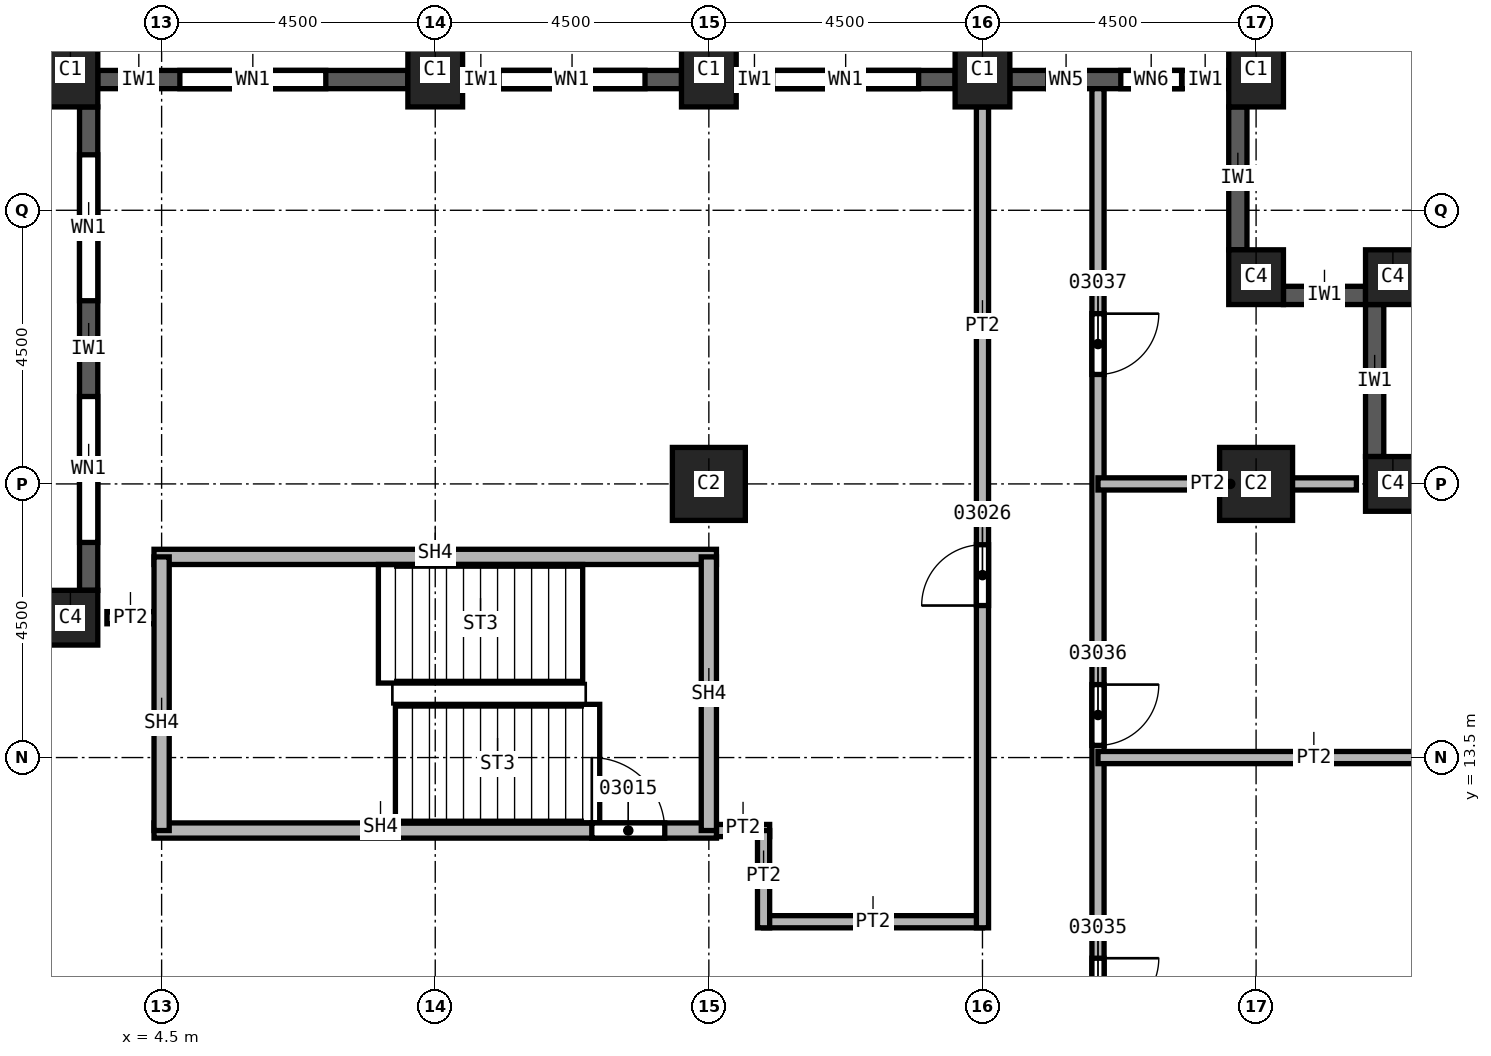
"""IFC4 building model, lengths in metres.
Left out: names, types, materials, properties, quantities, classifications, styles, units other than length and angle.
Written with IfcOpenShell. Run it as: python <this file> out.ifc"""

import sys

from ifc_helpers import new_model, si_unit, direction, frame, frame_2d, origin, origin_2d, place, context, subcontext, project, spatial, rectangle, extrude, element, fill, save


model = new_model("IFC4")
c1 = context("Model", 3, precision=1e-05, world=origin(), true_north=direction((0.0, 1.0)))
c2 = subcontext(c1, "Body", "Model", "MODEL_VIEW")
j1 = project(units=[si_unit("LENGTHUNIT", "METRE"), si_unit("PLANEANGLEUNIT", "RADIAN")], contexts=[c1])
p1 = place(None, origin())
s1 = spatial("IfcSite", under=j1, at=p1, CompositionType="ELEMENT")
p2 = place(p1, origin())
s2 = spatial("IfcBuilding", under=s1, at=p2, CompositionType="ELEMENT")
p3 = place(p2, frame((0.0, 0.0, 92.0)))
s3 = spatial("IfcBuildingStorey", under=s2, at=p3, CompositionType="ELEMENT", Elevation=92.0)
for number, where, z_axis, x_axis in (
    (1, (13.5, 18.0, 0.0), (0.0, 0.0, 1.0), (1.0, 0.0, 0.0)),
    (2, (22.5, 18.0, 0.0), (0.0, 0.0, 1.0), (1.0, 0.0, 0.0)),
):
    element("IfcColumn", number, at=place(p3, frame(where, z_axis=z_axis, x_axis=x_axis)), inside=s3, PredefinedType="COLUMN", context=c2, shape_type="SweptSolid", body=[
        extrude(rectangle(XDim=1.2, YDim=1.2, at=origin_2d()), origin(), (0.0, 0.0, 1.0), 3.7),
    ])
for number, where, z_axis, x_axis in (
    (3, (3.0, 24.8, 0.0), (0.0, 0.0, 1.0), (1.0, 0.0, 0.0)),
    (4, (9.0, 24.8, 0.0), (0.0, 0.0, 1.0), (1.0, 0.0, 0.0)),
    (5, (13.5, 24.8, 0.0), (0.0, 0.0, 1.0), (1.0, 0.0, 0.0)),
    (6, (18.0, 24.8, 0.0), (0.0, 0.0, 1.0), (1.0, 0.0, 0.0)),
    (7, (22.5, 24.8, 0.0), (0.0, 0.0, 1.0), (1.0, 0.0, 0.0)),
):
    element("IfcColumn", number, at=place(p3, frame(where, z_axis=z_axis, x_axis=x_axis)), inside=s3, PredefinedType="COLUMN", context=c2, shape_type="SweptSolid", body=[
        extrude(rectangle(XDim=0.9, YDim=1.2, at=origin_2d()), origin(), (0.0, 0.0, 1.0), 3.7),
    ])
for number, where, z_axis, x_axis in (
    (8, (3.0, 15.8, 0.0), (0.0, 0.0, 1.0), (1.0, 0.0, 0.0)),
    (9, (22.5, 21.4, 0.0), (0.0, 0.0, 1.0), (1.0, 0.0, 0.0)),
    (10, (24.75, 21.4, 0.0), (0.0, 0.0, 1.0), (1.0, 0.0, 0.0)),
    (11, (24.75, 18.0, 0.0), (0.0, 0.0, 1.0), (1.0, 0.0, 0.0)),
):
    element("IfcColumn", number, at=place(p3, frame(where, z_axis=z_axis, x_axis=x_axis)), inside=s3, PredefinedType="COLUMN", context=c2, shape_type="SweptSolid", body=[
        extrude(rectangle(XDim=0.9, YDim=0.9, at=origin_2d()), origin(), (0.0, 0.0, 1.0), 3.7),
    ])
p4 = place(p3, frame((24.45, 18.45, 0.0), z_axis=(0.0, 0.0, 1.0), x_axis=(0.0, 1.0, 0.0)))
e12 = element("IfcWall", 12, at=p4, inside=s3, PredefinedType="SOLIDWALL", context=c2, shape_type="SweptSolid", body=[
    extrude(rectangle(XDim=2.5, YDim=0.3, at=frame_2d((1.25, 0.0))), origin(), (0.0, 0.0, 1.0), 3.1),
])
p5 = place(p3, frame((24.3, 21.1, 0.0), z_axis=(0.0, 0.0, 1.0), x_axis=(-1.0, 0.0, 0.0)))
e13 = element("IfcWall", 13, at=p5, inside=s3, PredefinedType="SOLIDWALL", context=c2, shape_type="SweptSolid", body=[
    extrude(rectangle(XDim=1.35, YDim=0.3, at=frame_2d((0.675, 0.0))), origin(), (0.0, 0.0, 1.0), 3.1),
])
p6 = place(p3, frame((22.2, 21.85, 0.0), z_axis=(0.0, 0.0, 1.0), x_axis=(0.0, 1.0, 0.0)))
e14 = element("IfcWall", 14, at=p6, inside=s3, PredefinedType="SOLIDWALL", context=c2, shape_type="SweptSolid", body=[
    extrude(rectangle(XDim=2.35, YDim=0.3, at=frame_2d((1.175, 0.0))), origin(), (0.0, 0.0, 1.0), 3.1),
])
p7 = place(p3, frame((22.05, 24.65, 0.0), z_axis=(0.0, 0.0, 1.0), x_axis=(-1.0, 0.0, 0.0)))
e15 = element("IfcWall", 15, at=p7, inside=s3, PredefinedType="SOLIDWALL", context=c2, shape_type="SweptSolid", body=[
    extrude(rectangle(XDim=3.6, YDim=0.3, at=frame_2d((1.8, 0.0))), origin(), (0.0, 0.0, 1.0), 3.1),
])
p8 = place(p7, frame((0.775, 0.0, 0.8)))
e16 = element("IfcOpeningElement", 16, at=p8, cuts=e15, PredefinedType="OPENING", context=c2, shape_type="SweptSolid", body=[
    extrude(rectangle(XDim=1.0, YDim=1.95, at=frame_2d((0.5, 0.975))), frame((0.0, 0.15, 0.0), z_axis=(0.0, -1.0, 0.0), x_axis=(1.0, 0.0, 0.0)), (0.0, 0.0, 1.0), 0.3),
])
p9 = place(p7, frame((2.375, 0.0, 0.8)))
e17 = element("IfcOpeningElement", 17, at=p9, cuts=e15, PredefinedType="OPENING", context=c2, shape_type="SweptSolid", body=[
    extrude(rectangle(XDim=0.6, YDim=1.95, at=frame_2d((0.3, 0.975))), frame((0.0, 0.15, 0.0), z_axis=(0.0, -1.0, 0.0), x_axis=(1.0, 0.0, 0.0)), (0.0, 0.0, 1.0), 0.3),
])
p10 = place(p3, frame((17.55, 24.65, 0.0), z_axis=(0.0, 0.0, 1.0), x_axis=(-1.0, 0.0, 0.0)))
e18 = element("IfcWall", 18, at=p10, inside=s3, PredefinedType="SOLIDWALL", context=c2, shape_type="SweptSolid", body=[
    extrude(rectangle(XDim=3.6, YDim=0.3, at=frame_2d((1.8, 0.0))), origin(), (0.0, 0.0, 1.0), 3.1),
])
p11 = place(p10, frame((0.6, 0.0, 0.8)))
e19 = element("IfcOpeningElement", 19, at=p11, cuts=e18, PredefinedType="OPENING", context=c2, shape_type="SweptSolid", body=[
    extrude(rectangle(XDim=2.4, YDim=1.95, at=frame_2d((1.2, 0.975))), frame((0.0, 0.15, 0.0), z_axis=(0.0, -1.0, 0.0), x_axis=(1.0, 0.0, 0.0)), (0.0, 0.0, 1.0), 0.3),
])
p12 = place(p3, frame((13.05, 24.65, 0.0), z_axis=(0.0, 0.0, 1.0), x_axis=(-1.0, 0.0, 0.0)))
e20 = element("IfcWall", 20, at=p12, inside=s3, PredefinedType="SOLIDWALL", context=c2, shape_type="SweptSolid", body=[
    extrude(rectangle(XDim=3.6, YDim=0.3, at=frame_2d((1.8, 0.0))), origin(), (0.0, 0.0, 1.0), 3.1),
])
p13 = place(p12, frame((0.6, 0.0, 0.8)))
e21 = element("IfcOpeningElement", 21, at=p13, cuts=e20, PredefinedType="OPENING", context=c2, shape_type="SweptSolid", body=[
    extrude(rectangle(XDim=2.4, YDim=1.95, at=frame_2d((1.2, 0.975))), frame((0.0, 0.15, 0.0), z_axis=(0.0, -1.0, 0.0), x_axis=(1.0, 0.0, 0.0)), (0.0, 0.0, 1.0), 0.3),
])
p14 = place(p3, frame((8.55, 24.65, 0.0), z_axis=(0.0, 0.0, 1.0), x_axis=(-1.0, 0.0, 0.0)))
e22 = element("IfcWall", 22, at=p14, inside=s3, PredefinedType="SOLIDWALL", context=c2, shape_type="SweptSolid", body=[
    extrude(rectangle(XDim=5.1, YDim=0.3, at=frame_2d((2.55, 0.0))), origin(), (0.0, 0.0, 1.0), 3.1),
])
p15 = place(p14, frame((1.35, 0.0, 0.8)))
e23 = element("IfcOpeningElement", 23, at=p15, cuts=e22, PredefinedType="OPENING", context=c2, shape_type="SweptSolid", body=[
    extrude(rectangle(XDim=2.4, YDim=1.95, at=frame_2d((1.2, 0.975))), frame((0.0, 0.15, 0.0), z_axis=(0.0, -1.0, 0.0), x_axis=(1.0, 0.0, 0.0)), (0.0, 0.0, 1.0), 0.3),
])
p16 = place(p3, frame((3.3, 24.2, 0.0), z_axis=(0.0, 0.0, 1.0), x_axis=(0.0, -1.0, 0.0)))
e24 = element("IfcWall", 24, at=p16, inside=s3, PredefinedType="SOLIDWALL", context=c2, shape_type="SweptSolid", body=[
    extrude(rectangle(XDim=7.95, YDim=0.3, at=frame_2d((3.975, 0.0))), origin(), (0.0, 0.0, 1.0), 3.1),
])
p17 = place(p16, frame((0.788, 0.0, 0.8)))
e25 = element("IfcOpeningElement", 25, at=p17, cuts=e24, PredefinedType="OPENING", context=c2, shape_type="SweptSolid", body=[
    extrude(rectangle(XDim=2.4, YDim=1.95, at=frame_2d((1.2, 0.975))), frame((0.0, 0.15, 0.0), z_axis=(0.0, -1.0, 0.0), x_axis=(1.0, 0.0, 0.0)), (0.0, 0.0, 1.0), 0.3),
])
p18 = place(p16, frame((4.762, 0.0, 0.8)))
e26 = element("IfcOpeningElement", 26, at=p18, cuts=e24, PredefinedType="OPENING", context=c2, shape_type="SweptSolid", body=[
    extrude(rectangle(XDim=2.4, YDim=1.95, at=frame_2d((1.2, 0.975))), frame((0.0, 0.15, 0.0), z_axis=(0.0, -1.0, 0.0), x_axis=(1.0, 0.0, 0.0)), (0.0, 0.0, 1.0), 0.3),
])
p19 = place(p3, frame((3.6, 15.8, 0.0), z_axis=(0.0, 0.0, 1.0), x_axis=(1.0, 0.0, 0.0)))
e27 = element("IfcWall", 27, at=p19, inside=s3, PredefinedType="PARTITIONING", context=c2, shape_type="SweptSolid", body=[
    extrude(rectangle(XDim=0.9, YDim=0.2, at=frame_2d((0.45, 0.0))), origin(), (0.0, 0.0, 1.0), 3.7),
])
p20 = place(p3, frame((13.375, 12.3, 0.0), z_axis=(0.0, 0.0, 1.0), x_axis=(1.0, 0.0, 0.0)))
e28 = element("IfcWall", 28, at=p20, inside=s3, PredefinedType="PARTITIONING", context=c2, shape_type="SweptSolid", body=[
    extrude(rectangle(XDim=1.125, YDim=0.2, at=frame_2d((0.562, 0.0))), origin(), (0.0, 0.0, 1.0), 3.7),
])
p21 = place(p3, frame((14.4, 10.8, 0.0), z_axis=(0.0, 0.0, 1.0), x_axis=(1.0, 0.0, 0.0)))
e29 = element("IfcWall", 29, at=p21, inside=s3, PredefinedType="PARTITIONING", context=c2, shape_type="SweptSolid", body=[
    extrude(rectangle(XDim=3.6, YDim=0.2, at=frame_2d((1.8, 0.0))), origin(), (0.0, 0.0, 1.0), 3.7),
])
p22 = place(p3, frame((14.4, 12.3, 0.0), z_axis=(0.0, 0.0, 1.0), x_axis=(0.0, -1.0, 0.0)))
e30 = element("IfcWall", 30, at=p22, inside=s3, PredefinedType="PARTITIONING", context=c2, shape_type="SweptSolid", body=[
    extrude(rectangle(XDim=1.6, YDim=0.2, at=frame_2d((0.8, 0.0))), origin(), (0.0, 0.0, 1.0), 3.7),
])
p23 = place(p3, frame((18.0, 10.7, 0.0), z_axis=(0.0, 0.0, 1.0), x_axis=(0.0, 1.0, 0.0)))
e31 = element("IfcWall", 31, at=p23, inside=s3, PredefinedType="PARTITIONING", context=c2, shape_type="SweptSolid", body=[
    extrude(rectangle(XDim=13.5, YDim=0.2, at=frame_2d((6.75, 0.0))), origin(), (0.0, 0.0, 1.0), 3.7),
])
p24 = place(p23, frame((5.3, 0.0, 0.0)))
e32 = element("IfcOpeningElement", 32, at=p24, cuts=e31, PredefinedType="OPENING", context=c2, shape_type="SweptSolid", body=[
    extrude(rectangle(XDim=1.0, YDim=2.1, at=frame_2d((0.5, 1.05))), frame((0.0, 0.1, 0.0), z_axis=(0.0, -1.0, 0.0), x_axis=(1.0, 0.0, 0.0)), (0.0, 0.0, 1.0), 0.2),
])
p25 = place(p3, frame((19.9, 24.5, 0.0), z_axis=(0.0, 0.0, 1.0), x_axis=(0.0, -1.0, 0.0)))
e33 = element("IfcWall", 33, at=p25, inside=s3, PredefinedType="PARTITIONING", context=c2, shape_type="SweptSolid", body=[
    extrude(rectangle(XDim=25.35, YDim=0.2, at=frame_2d((12.675, 0.0))), origin(), (0.0, 0.0, 1.0), 3.7),
])
p26 = place(p25, frame((17.15, 0.0, 0.0)))
e34 = element("IfcOpeningElement", 34, at=p26, cuts=e33, PredefinedType="OPENING", context=c2, shape_type="SweptSolid", body=[
    extrude(rectangle(XDim=1.0, YDim=2.1, at=frame_2d((0.5, 1.05))), frame((0.0, 0.1, 0.0), z_axis=(0.0, -1.0, 0.0), x_axis=(1.0, 0.0, 0.0)), (0.0, 0.0, 1.0), 0.2),
])
p27 = place(p25, frame((14.3, 0.0, 0.0)))
e35 = element("IfcOpeningElement", 35, at=p27, cuts=e33, PredefinedType="OPENING", context=c2, shape_type="SweptSolid", body=[
    extrude(rectangle(XDim=1.0, YDim=2.1, at=frame_2d((0.5, 1.05))), frame((0.0, 0.1, 0.0), z_axis=(0.0, -1.0, 0.0), x_axis=(1.0, 0.0, 0.0)), (0.0, 0.0, 1.0), 0.2),
])
p28 = place(p25, frame((9.8, 0.0, 0.0)))
e36 = element("IfcOpeningElement", 36, at=p28, cuts=e33, PredefinedType="OPENING", context=c2, shape_type="SweptSolid", body=[
    extrude(rectangle(XDim=1.0, YDim=2.1, at=frame_2d((0.5, 1.05))), frame((0.0, 0.1, 0.0), z_axis=(0.0, -1.0, 0.0), x_axis=(1.0, 0.0, 0.0)), (0.0, 0.0, 1.0), 0.2),
])
p29 = place(p25, frame((3.7, 0.0, 0.0)))
e37 = element("IfcOpeningElement", 37, at=p29, cuts=e33, PredefinedType="OPENING", context=c2, shape_type="SweptSolid", body=[
    extrude(rectangle(XDim=1.0, YDim=2.1, at=frame_2d((0.5, 1.05))), frame((0.0, 0.1, 0.0), z_axis=(0.0, -1.0, 0.0), x_axis=(1.0, 0.0, 0.0)), (0.0, 0.0, 1.0), 0.2),
])
p30 = place(p3, frame((19.9, 13.5, 0.0), z_axis=(0.0, 0.0, 1.0), x_axis=(1.0, 0.0, 0.0)))
e38 = element("IfcWall", 38, at=p30, inside=s3, PredefinedType="PARTITIONING", context=c2, shape_type="SweptSolid", body=[
    extrude(rectangle(XDim=7.2, YDim=0.2, at=frame_2d((3.6, 0.0))), origin(), (0.0, 0.0, 1.0), 3.7),
])
p31 = place(p3, frame((19.9, 18.0, 0.0), z_axis=(0.0, 0.0, 1.0), x_axis=(1.0, 0.0, 0.0)))
e39 = element("IfcWall", 39, at=p31, inside=s3, PredefinedType="PARTITIONING", context=c2, shape_type="SweptSolid", body=[
    extrude(rectangle(XDim=4.25, YDim=0.2, at=frame_2d((2.125, 0.0))), origin(), (0.0, 0.0, 1.0), 3.7),
])
p32 = place(p3, frame((4.375, 12.3, 0.0), z_axis=(0.0, 0.0, 1.0), x_axis=(1.0, 0.0, 0.0)))
e40 = element("IfcWall", 40, at=p32, inside=s3, PredefinedType="SOLIDWALL", context=c2, shape_type="SweptSolid", body=[
    extrude(rectangle(XDim=9.25, YDim=0.25, at=frame_2d((4.625, 0.0))), origin(), (0.0, 0.0, 1.0), 3.7),
])
p33 = place(p32, frame((7.2, 0.0, 0.0)))
e41 = element("IfcOpeningElement", 41, at=p33, cuts=e40, PredefinedType="OPENING", context=c2, shape_type="SweptSolid", body=[
    extrude(rectangle(XDim=1.2, YDim=2.1, at=frame_2d((0.6, 1.05))), frame((0.0, 0.125, 0.0), z_axis=(0.0, -1.0, 0.0), x_axis=(1.0, 0.0, 0.0)), (0.0, 0.0, 1.0), 0.25),
])
p34 = place(p3, frame((4.375, 16.8, 0.0), z_axis=(0.0, 0.0, 1.0), x_axis=(1.0, 0.0, 0.0)))
e42 = element("IfcWall", 42, at=p34, inside=s3, PredefinedType="SOLIDWALL", context=c2, shape_type="SweptSolid", body=[
    extrude(rectangle(XDim=9.25, YDim=0.25, at=frame_2d((4.625, 0.0))), origin(), (0.0, 0.0, 1.0), 3.7),
])
for number, where, z_axis, x_axis in (
    (43, (4.5, 12.3, 0.0), (0.0, 0.0, 1.0), (0.0, 1.0, 0.0)),
    (44, (13.5, 16.8, 0.0), (0.0, 0.0, 1.0), (0.0, -1.0, 0.0)),
):
    element("IfcWall", number, at=place(p3, frame(where, z_axis=z_axis, x_axis=x_axis)), inside=s3, PredefinedType="SOLIDWALL", context=c2, shape_type="SweptSolid", body=[
        extrude(rectangle(XDim=4.5, YDim=0.25, at=frame_2d((2.25, 0.0))), origin(), (0.0, 0.0, 1.0), 3.7),
    ])
p35 = place(p11, origin())
e45 = element("IfcWindow", 45, at=p35, inside=s3, PartitioningType="SINGLE_PANEL", PredefinedType="WINDOW", context=c2, shape_type="SweptSolid", body=[
    extrude(rectangle(XDim=2.4, YDim=1.95, at=frame_2d((1.2, 0.975))), frame((0.0, 0.03, 0.0), z_axis=(0.0, -1.0, 0.0), x_axis=(1.0, 0.0, 0.0)), (0.0, 0.0, 1.0), 0.06),
])
fill(e19, e45)
p36 = place(p13, origin())
e46 = element("IfcWindow", 46, at=p36, inside=s3, PartitioningType="SINGLE_PANEL", PredefinedType="WINDOW", context=c2, shape_type="SweptSolid", body=[
    extrude(rectangle(XDim=2.4, YDim=1.95, at=frame_2d((1.2, 0.975))), frame((0.0, 0.03, 0.0), z_axis=(0.0, -1.0, 0.0), x_axis=(1.0, 0.0, 0.0)), (0.0, 0.0, 1.0), 0.06),
])
fill(e21, e46)
p37 = place(p15, origin())
e47 = element("IfcWindow", 47, at=p37, inside=s3, PartitioningType="SINGLE_PANEL", PredefinedType="WINDOW", context=c2, shape_type="SweptSolid", body=[
    extrude(rectangle(XDim=2.4, YDim=1.95, at=frame_2d((1.2, 0.975))), frame((0.0, 0.03, 0.0), z_axis=(0.0, -1.0, 0.0), x_axis=(1.0, 0.0, 0.0)), (0.0, 0.0, 1.0), 0.06),
])
fill(e23, e47)
p38 = place(p17, origin())
e48 = element("IfcWindow", 48, at=p38, inside=s3, PartitioningType="SINGLE_PANEL", PredefinedType="WINDOW", context=c2, shape_type="SweptSolid", body=[
    extrude(rectangle(XDim=2.4, YDim=1.95, at=frame_2d((1.2, 0.975))), frame((0.0, 0.03, 0.0), z_axis=(0.0, -1.0, 0.0), x_axis=(1.0, 0.0, 0.0)), (0.0, 0.0, 1.0), 0.06),
])
fill(e25, e48)
p39 = place(p18, origin())
e49 = element("IfcWindow", 49, at=p39, inside=s3, PartitioningType="SINGLE_PANEL", PredefinedType="WINDOW", context=c2, shape_type="SweptSolid", body=[
    extrude(rectangle(XDim=2.4, YDim=1.95, at=frame_2d((1.2, 0.975))), frame((0.0, 0.03, 0.0), z_axis=(0.0, -1.0, 0.0), x_axis=(1.0, 0.0, 0.0)), (0.0, 0.0, 1.0), 0.06),
])
fill(e26, e49)
p40 = place(p33, origin())
e50 = element("IfcDoor", 50, at=p40, inside=s3, OperationType="SINGLE_SWING_RIGHT", PredefinedType="DOOR", context=c2, shape_type="SweptSolid", body=[
    extrude(rectangle(XDim=1.2, YDim=2.1, at=frame_2d((0.6, 1.05))), frame((0.0, 0.025, 0.0), z_axis=(0.0, -1.0, 0.0), x_axis=(1.0, 0.0, 0.0)), (0.0, 0.0, 1.0), 0.05),
])
fill(e41, e50)
p41 = place(p24, origin())
e51 = element("IfcDoor", 51, at=p41, inside=s3, OperationType="SINGLE_SWING_LEFT", PredefinedType="DOOR", context=c2, shape_type="SweptSolid", body=[
    extrude(rectangle(XDim=1.0, YDim=2.1, at=frame_2d((0.5, 1.05))), frame((0.0, 0.025, 0.0), z_axis=(0.0, -1.0, 0.0), x_axis=(1.0, 0.0, 0.0)), (0.0, 0.0, 1.0), 0.05),
])
fill(e32, e51)
p42 = place(p27, origin())
e52 = element("IfcDoor", 52, at=p42, inside=s3, OperationType="SINGLE_SWING_RIGHT", PredefinedType="DOOR", context=c2, shape_type="SweptSolid", body=[
    extrude(rectangle(XDim=1.0, YDim=2.1, at=frame_2d((0.5, 1.05))), frame((0.0, 0.025, 0.0), z_axis=(0.0, -1.0, 0.0), x_axis=(1.0, 0.0, 0.0)), (0.0, 0.0, 1.0), 0.05),
])
fill(e35, e52)
p43 = place(p28, origin())
e53 = element("IfcDoor", 53, at=p43, inside=s3, OperationType="SINGLE_SWING_LEFT", PredefinedType="DOOR", context=c2, shape_type="SweptSolid", body=[
    extrude(rectangle(XDim=1.0, YDim=2.1, at=frame_2d((0.5, 1.05))), frame((0.0, 0.025, 0.0), z_axis=(0.0, -1.0, 0.0), x_axis=(1.0, 0.0, 0.0)), (0.0, 0.0, 1.0), 0.05),
])
fill(e36, e53)
p44 = place(p29, origin())
e54 = element("IfcDoor", 54, at=p44, inside=s3, OperationType="SINGLE_SWING_RIGHT", PredefinedType="DOOR", context=c2, shape_type="SweptSolid", body=[
    extrude(rectangle(XDim=1.0, YDim=2.1, at=frame_2d((0.5, 1.05))), frame((0.0, 0.025, 0.0), z_axis=(0.0, -1.0, 0.0), x_axis=(1.0, 0.0, 0.0)), (0.0, 0.0, 1.0), 0.05),
])
fill(e37, e54)
p45 = place(p8, origin())
e55 = element("IfcWindow", 55, at=p45, inside=s3, PartitioningType="SINGLE_PANEL", PredefinedType="WINDOW", context=c2, shape_type="SweptSolid", body=[
    extrude(rectangle(XDim=1.0, YDim=1.95, at=frame_2d((0.5, 0.975))), frame((0.0, 0.03, 0.0), z_axis=(0.0, -1.0, 0.0), x_axis=(1.0, 0.0, 0.0)), (0.0, 0.0, 1.0), 0.06),
])
fill(e16, e55)
p46 = place(p9, origin())
e56 = element("IfcWindow", 56, at=p46, inside=s3, PartitioningType="SINGLE_PANEL", PredefinedType="WINDOW", context=c2, shape_type="SweptSolid", body=[
    extrude(rectangle(XDim=0.6, YDim=1.95, at=frame_2d((0.3, 0.975))), frame((0.0, 0.03, 0.0), z_axis=(0.0, -1.0, 0.0), x_axis=(1.0, 0.0, 0.0)), (0.0, 0.0, 1.0), 0.06),
])
fill(e17, e56)
save(model, sys.argv[1])
